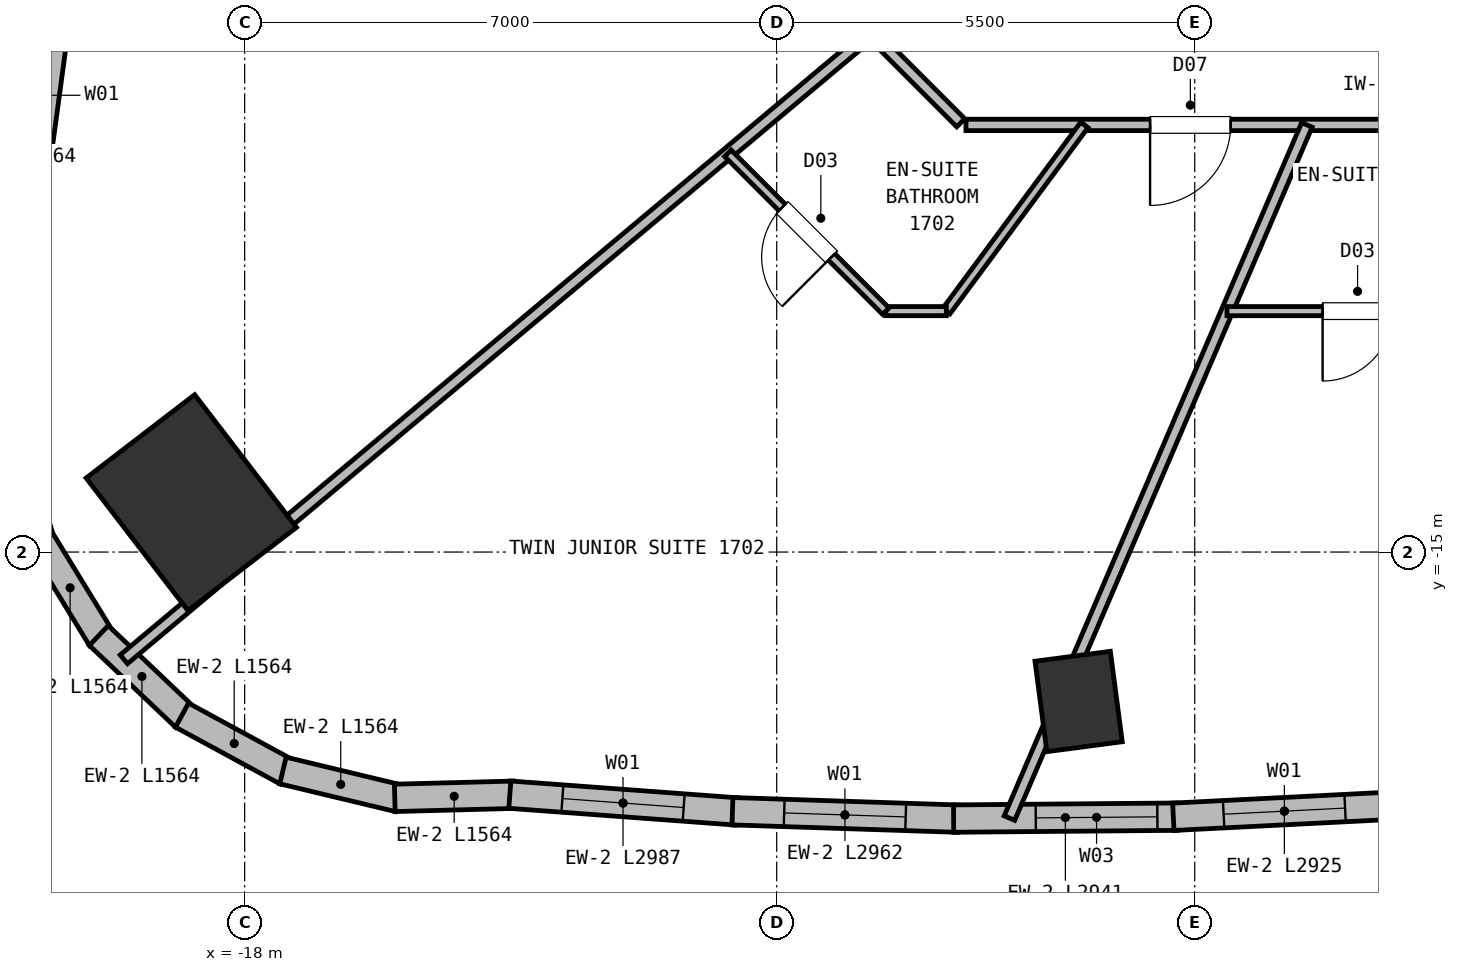
"""IFC4 building model, lengths in metres.
Left out: names, types, materials, properties, quantities, classifications, styles, units other than length and angle.
Written with IfcOpenShell. Run it as: python <this file> out.ifc"""

import sys

from ifc_helpers import new_model, si_unit, direction, frame, frame_2d, origin, origin_2d, place, context, subcontext, project, spatial, rectangle, extrude, element, fill, save


model = new_model("IFC4")
c1 = context("Model", 3, precision=1e-05, world=origin(), true_north=direction((0.0, 1.0)))
c2 = subcontext(c1, "Body", "Model", "MODEL_VIEW")
j1 = project(units=[si_unit("LENGTHUNIT", "METRE"), si_unit("PLANEANGLEUNIT", "RADIAN")], contexts=[c1])
p1 = place(None, origin())
s1 = spatial("IfcSite", under=j1, at=p1, CompositionType="ELEMENT")
p2 = place(p1, origin())
s2 = spatial("IfcBuilding", under=s1, at=p2, CompositionType="ELEMENT")
p3 = place(p2, frame((0.0, 0.0, 60.5)))
s3 = spatial("IfcBuildingStorey", under=s2, at=p3, CompositionType="ELEMENT", Elevation=60.5)
p4 = place(p3, frame((-18.702, -14.351, 0.0), z_axis=(0.0, 0.0, 1.0), x_axis=(0.793353340291, 0.608761429009, 0.0)))
e1 = element("IfcColumn", 1, at=p4, inside=s3, PredefinedType="COLUMN", context=c2, shape_type="SweptSolid", body=[
    extrude(rectangle(XDim=1.8, YDim=2.2, at=origin_2d()), origin(), (0.0, 0.0, 1.0), 3.75),
])
p5 = place(p3, frame((-7.028, -16.966, 0.0), z_axis=(0.0, 0.0, 1.0), x_axis=(0.991444861374, 0.13052619222, 0.0)))
e2 = element("IfcColumn", 2, at=p5, inside=s3, PredefinedType="COLUMN", context=c2, shape_type="SweptSolid", body=[
    extrude(rectangle(XDim=1.0, YDim=1.2, at=origin_2d()), origin(), (0.0, 0.0, 1.0), 3.75),
])
p6 = place(p3, frame((-20.812, -10.412, 0.0), z_axis=(0.0, 0.0, 1.0), x_axis=(0.134391985669, 0.990928248759, 0.0)))
e3 = element("IfcWall", 3, at=p6, inside=s3, PredefinedType="SOLIDWALL", context=c2, shape_type="SweptSolid", body=[
    extrude(rectangle(XDim=2.87, YDim=0.36, at=frame_2d((1.435, 0.0))), origin(), (0.0, 0.0, 1.0), 3.5),
])
p7 = place(p6, frame((0.635, 0.0, 0.72)))
e4 = element("IfcOpeningElement", 4, at=p7, cuts=e3, PredefinedType="OPENING", context=c2, shape_type="SweptSolid", body=[
    extrude(rectangle(XDim=1.6, YDim=1.88, at=frame_2d((0.8, 0.94))), frame((0.0, 0.19, 0.0), z_axis=(0.0, -1.0, 0.0), x_axis=(1.0, 0.0, 0.0)), (0.0, 0.0, 1.0), 0.38),
])
p8 = place(p3, frame((-20.685, -14.849, 0.0), z_axis=(0.0, 0.0, 1.0), x_axis=(-0.284067072714, 0.958804410816, 0.0)))
e5 = element("IfcWall", 5, at=p8, inside=s3, PredefinedType="SOLIDWALL", context=c2, shape_type="SweptSolid", body=[
    extrude(rectangle(XDim=1.564, YDim=0.36, at=frame_2d((0.782, 0.0))), origin(), (0.0, 0.0, 1.0), 3.5),
])
for number, where, z_axis, x_axis in (
    (6, (-19.888, -16.137, 0.0), (0.0, 0.0, 1.0), (-0.523, 0.853, 0.0)),
    (7, (-18.785, -17.175, 0.0), (0.0, 0.0, 1.0), (-0.725, 0.688, 0.0)),
    (8, (-17.45, -17.892, 0.0), (0.0, 0.0, 1.0), (-0.879, 0.477, 0.0)),
    (9, (-15.976, -18.24, 0.0), (0.0, 0.0, 1.0), (-0.972, 0.233, 0.0)),
):
    element("IfcWall", number, at=place(p3, frame(where, z_axis=z_axis, x_axis=x_axis)), inside=s3, PredefinedType="SOLIDWALL", context=c2, shape_type="SweptSolid", body=[
        extrude(rectangle(XDim=1.564, YDim=0.36, at=frame_2d((0.782, 0.0))), origin(), (0.0, 0.0, 1.0), 3.5),
    ])
p9 = place(p3, frame((-14.461, -18.193, 0.0), z_axis=(0.0, 0.0, 1.0), x_axis=(-0.999656183846, -0.026220490068, 0.0)))
e10 = element("IfcWall", 10, at=p9, inside=s3, PredefinedType="SOLIDWALL", context=c2, shape_type="SweptSolid", body=[
    extrude(rectangle(XDim=1.564, YDim=0.36, at=frame_2d((0.782, 0.0))), origin(), (0.0, 0.0, 1.0), 3.5),
])
p10 = place(p3, frame((-11.532, -18.413, 0.0), z_axis=(0.0, 0.0, 1.0), x_axis=(-0.997278449025, 0.073727166709, 0.0)))
e11 = element("IfcWall", 11, at=p10, inside=s3, PredefinedType="SOLIDWALL", context=c2, shape_type="SweptSolid", body=[
    extrude(rectangle(XDim=2.987, YDim=0.36, at=frame_2d((1.493, 0.0))), origin(), (0.0, 0.0, 1.0), 3.5),
])
p11 = place(p10, frame((0.694, 0.0, 0.72)))
e12 = element("IfcOpeningElement", 12, at=p11, cuts=e11, PredefinedType="OPENING", context=c2, shape_type="SweptSolid", body=[
    extrude(rectangle(XDim=1.6, YDim=1.88, at=frame_2d((0.8, 0.94))), frame((0.0, 0.19, 0.0), z_axis=(0.0, -1.0, 0.0), x_axis=(1.0, 0.0, 0.0)), (0.0, 0.0, 1.0), 0.38),
])
p12 = place(p3, frame((-8.622, -18.508, 0.0), z_axis=(0.0, 0.0, 1.0), x_axis=(-0.999456194292, 0.032974470283, 0.0)))
e13 = element("IfcWall", 13, at=p12, inside=s3, PredefinedType="SOLIDWALL", context=c2, shape_type="SweptSolid", body=[
    extrude(rectangle(XDim=2.962, YDim=0.36, at=frame_2d((1.481, 0.0))), origin(), (0.0, 0.0, 1.0), 3.5),
])
p13 = place(p12, frame((0.681, 0.0, 0.72)))
e14 = element("IfcOpeningElement", 14, at=p13, cuts=e13, PredefinedType="OPENING", context=c2, shape_type="SweptSolid", body=[
    extrude(rectangle(XDim=1.6, YDim=1.88, at=frame_2d((0.8, 0.94))), frame((0.0, 0.19, 0.0), z_axis=(0.0, -1.0, 0.0), x_axis=(1.0, 0.0, 0.0)), (0.0, 0.0, 1.0), 0.38),
])
p14 = place(p3, frame((-5.732, -18.482, 0.0), z_axis=(0.0, 0.0, 1.0), x_axis=(-0.999962726619, -0.008633966257, 0.0)))
e15 = element("IfcWall", 15, at=p14, inside=s3, PredefinedType="SOLIDWALL", context=c2, shape_type="SweptSolid", body=[
    extrude(rectangle(XDim=2.941, YDim=0.36, at=frame_2d((1.47, 0.0))), origin(), (0.0, 0.0, 1.0), 3.5),
])
p15 = place(p14, frame((0.26, 0.0, 0.72)))
e16 = element("IfcOpeningElement", 16, at=p15, cuts=e15, PredefinedType="OPENING", context=c2, shape_type="SweptSolid", body=[
    extrude(rectangle(XDim=1.6, YDim=1.88, at=frame_2d((0.8, 0.94))), frame((0.0, 0.19, 0.0), z_axis=(0.0, -1.0, 0.0), x_axis=(1.0, 0.0, 0.0)), (0.0, 0.0, 1.0), 0.38),
])
p16 = place(p3, frame((-2.86, -18.335, 0.0), z_axis=(0.0, 0.0, 1.0), x_axis=(-0.998716074647, -0.050657696775, 0.0)))
e17 = element("IfcWall", 17, at=p16, inside=s3, PredefinedType="SOLIDWALL", context=c2, shape_type="SweptSolid", body=[
    extrude(rectangle(XDim=2.925, YDim=0.36, at=frame_2d((1.463, 0.0))), origin(), (0.0, 0.0, 1.0), 3.5),
])
p17 = place(p16, frame((0.663, 0.0, 0.72)))
e18 = element("IfcOpeningElement", 18, at=p17, cuts=e17, PredefinedType="OPENING", context=c2, shape_type="SweptSolid", body=[
    extrude(rectangle(XDim=1.6, YDim=1.88, at=frame_2d((0.8, 0.94))), frame((0.0, 0.19, 0.0), z_axis=(0.0, -1.0, 0.0), x_axis=(1.0, 0.0, 0.0)), (0.0, 0.0, 1.0), 0.38),
])
p18 = place(p3, frame((8.51, -9.38, 0.0), z_axis=(0.0, 0.0, 1.0), x_axis=(-1.0, 0.0, 0.0)))
e19 = element("IfcWall", 19, at=p18, inside=s3, PredefinedType="PARTITIONING", context=c2, shape_type="SweptSolid", body=[
    extrude(rectangle(XDim=17.02, YDim=0.15, at=frame_2d((8.51, 0.0))), origin(), (0.0, 0.0, 1.0), 3.5),
])
p19 = place(p18, frame((2.589, 0.0, 0.0)))
e20 = element("IfcOpeningElement", 20, at=p19, cuts=e19, PredefinedType="OPENING", context=c2, shape_type="SweptSolid", body=[
    extrude(rectangle(XDim=1.0, YDim=2.15, at=frame_2d((0.5, 1.075))), frame((0.0, 0.085, 0.0), z_axis=(0.0, -1.0, 0.0), x_axis=(1.0, 0.0, 0.0)), (0.0, 0.0, 1.0), 0.17),
])
p20 = place(p18, frame((7.843, 0.0, 0.0)))
e21 = element("IfcOpeningElement", 21, at=p20, cuts=e19, PredefinedType="OPENING", context=c2, shape_type="SweptSolid", body=[
    extrude(rectangle(XDim=1.06, YDim=2.15, at=frame_2d((0.53, 1.075))), frame((0.0, 0.085, 0.0), z_axis=(0.0, -1.0, 0.0), x_axis=(1.0, 0.0, 0.0)), (0.0, 0.0, 1.0), 0.17),
])
p21 = place(p18, frame((13.537, 0.0, 0.0)))
e22 = element("IfcOpeningElement", 22, at=p21, cuts=e19, PredefinedType="OPENING", context=c2, shape_type="SweptSolid", body=[
    extrude(rectangle(XDim=1.06, YDim=2.15, at=frame_2d((0.53, 1.075))), frame((0.0, 0.085, 0.0), z_axis=(0.0, -1.0, 0.0), x_axis=(1.0, 0.0, 0.0)), (0.0, 0.0, 1.0), 0.17),
])
p22 = place(p3, frame((-8.578, -9.352, 0.0), z_axis=(0.0, 0.0, 1.0), x_axis=(-0.707067066127, 0.707146494016, 0.0)))
e23 = element("IfcWall", 23, at=p22, inside=s3, PredefinedType="PARTITIONING", context=c2, shape_type="SweptSolid", body=[
    extrude(rectangle(XDim=3.074, YDim=0.15, at=frame_2d((1.537, 0.0))), origin(), (0.0, 0.0, 1.0), 3.5),
])
p23 = place(p3, frame((-9.756, -8.174, 0.0), z_axis=(0.0, 0.0, 1.0), x_axis=(-0.766555678026, -0.642177851134, 0.0)))
e24 = element("IfcWall", 24, at=p23, inside=s3, PredefinedType="PARTITIONING", context=c2, shape_type="SweptSolid", body=[
    extrude(rectangle(XDim=12.828, YDim=0.15, at=frame_2d((6.414, 0.0))), origin(), (0.0, 0.0, 1.0), 3.5),
])
p24 = place(p3, frame((-8.768, -11.83, 0.0), z_axis=(0.0, 0.0, 1.0), x_axis=(0.595378789074, 0.80344514282, 0.0)))
e25 = element("IfcWall", 25, at=p24, inside=s3, PredefinedType="PARTITIONING", context=c2, shape_type="SweptSolid", body=[
    extrude(rectangle(XDim=3.05, YDim=0.12, at=frame_2d((1.525, 0.0))), origin(), (0.0, 0.0, 1.0), 3.5),
])
p25 = place(p3, frame((-8.768, -11.83, 0.0), z_axis=(0.0, 0.0, 1.0), x_axis=(-1.0, 0.0, 0.0)))
e26 = element("IfcWall", 26, at=p25, inside=s3, PredefinedType="PARTITIONING", context=c2, shape_type="SweptSolid", body=[
    extrude(rectangle(XDim=0.797, YDim=0.12, at=frame_2d((0.398, 0.0))), origin(), (0.0, 0.0, 1.0), 3.5),
])
p26 = place(p3, frame((-9.565, -11.83, 0.0), z_axis=(0.0, 0.0, 1.0), x_axis=(-0.707106781187, 0.707106781187, 0.0)))
e27 = element("IfcWall", 27, at=p26, inside=s3, PredefinedType="PARTITIONING", context=c2, shape_type="SweptSolid", body=[
    extrude(rectangle(XDim=2.938, YDim=0.12, at=frame_2d((1.469, 0.0))), origin(), (0.0, 0.0, 1.0), 3.5),
])
p27 = place(p26, frame((1.009, 0.0, 0.0)))
e28 = element("IfcOpeningElement", 28, at=p27, cuts=e27, PredefinedType="OPENING", context=c2, shape_type="SweptSolid", body=[
    extrude(rectangle(XDim=0.92, YDim=2.1, at=frame_2d((0.46, 1.05))), frame((0.0, 0.07, 0.0), z_axis=(0.0, -1.0, 0.0), x_axis=(1.0, 0.0, 0.0)), (0.0, 0.0, 1.0), 0.14),
])
p28 = place(p3, frame((-4.025, -9.38, 0.0), z_axis=(0.0, 0.0, 1.0), x_axis=(-0.394293336578, -0.918984637919, 0.0)))
e29 = element("IfcWall", 29, at=p28, inside=s3, PredefinedType="PARTITIONING", context=c2, shape_type="SweptSolid", body=[
    extrude(rectangle(XDim=9.925, YDim=0.15, at=frame_2d((4.962, 0.0))), origin(), (0.0, 0.0, 1.0), 3.5),
])
p29 = place(p3, frame((-1.639, -11.83, 0.0), z_axis=(0.0, 0.0, 1.0), x_axis=(-1.0, 0.0, 0.0)))
e30 = element("IfcWall", 30, at=p29, inside=s3, PredefinedType="PARTITIONING", context=c2, shape_type="SweptSolid", body=[
    extrude(rectangle(XDim=3.437, YDim=0.12, at=frame_2d((1.718, 0.0))), origin(), (0.0, 0.0, 1.0), 3.5),
])
p30 = place(p29, frame((1.258, 0.0, 0.0)))
e31 = element("IfcOpeningElement", 31, at=p30, cuts=e30, PredefinedType="OPENING", context=c2, shape_type="SweptSolid", body=[
    extrude(rectangle(XDim=0.92, YDim=2.1, at=frame_2d((0.46, 1.05))), frame((0.0, 0.07, 0.0), z_axis=(0.0, -1.0, 0.0), x_axis=(1.0, 0.0, 0.0)), (0.0, 0.0, 1.0), 0.14),
])
p31 = place(p7, origin())
e32 = element("IfcWindow", 32, at=p31, inside=s3, PartitioningType="SINGLE_PANEL", PredefinedType="WINDOW", context=c2, shape_type="SweptSolid", body=[
    extrude(rectangle(XDim=1.6, YDim=1.88, at=frame_2d((0.8, 0.94))), frame((0.0, 0.03, 0.0), z_axis=(0.0, -1.0, 0.0), x_axis=(1.0, 0.0, 0.0)), (0.0, 0.0, 1.0), 0.06),
])
fill(e4, e32)
p32 = place(p11, origin())
e33 = element("IfcWindow", 33, at=p32, inside=s3, PartitioningType="SINGLE_PANEL", PredefinedType="WINDOW", context=c2, shape_type="SweptSolid", body=[
    extrude(rectangle(XDim=1.6, YDim=1.88, at=frame_2d((0.8, 0.94))), frame((0.0, 0.03, 0.0), z_axis=(0.0, -1.0, 0.0), x_axis=(1.0, 0.0, 0.0)), (0.0, 0.0, 1.0), 0.06),
])
fill(e12, e33)
p33 = place(p13, origin())
e34 = element("IfcWindow", 34, at=p33, inside=s3, PartitioningType="SINGLE_PANEL", PredefinedType="WINDOW", context=c2, shape_type="SweptSolid", body=[
    extrude(rectangle(XDim=1.6, YDim=1.88, at=frame_2d((0.8, 0.94))), frame((0.0, 0.03, 0.0), z_axis=(0.0, -1.0, 0.0), x_axis=(1.0, 0.0, 0.0)), (0.0, 0.0, 1.0), 0.06),
])
fill(e14, e34)
p34 = place(p15, origin())
e35 = element("IfcWindow", 35, at=p34, inside=s3, PartitioningType="SINGLE_PANEL", PredefinedType="WINDOW", context=c2, shape_type="SweptSolid", body=[
    extrude(rectangle(XDim=1.6, YDim=1.88, at=frame_2d((0.8, 0.94))), frame((0.0, 0.03, 0.0), z_axis=(0.0, -1.0, 0.0), x_axis=(1.0, 0.0, 0.0)), (0.0, 0.0, 1.0), 0.06),
])
fill(e16, e35)
p35 = place(p17, origin())
e36 = element("IfcWindow", 36, at=p35, inside=s3, PartitioningType="SINGLE_PANEL", PredefinedType="WINDOW", context=c2, shape_type="SweptSolid", body=[
    extrude(rectangle(XDim=1.6, YDim=1.88, at=frame_2d((0.8, 0.94))), frame((0.0, 0.03, 0.0), z_axis=(0.0, -1.0, 0.0), x_axis=(1.0, 0.0, 0.0)), (0.0, 0.0, 1.0), 0.06),
])
fill(e18, e36)
p36 = place(p27, origin())
e37 = element("IfcDoor", 37, at=p36, inside=s3, OperationType="SINGLE_SWING_LEFT", PredefinedType="DOOR", context=c2, shape_type="SweptSolid", body=[
    extrude(rectangle(XDim=0.92, YDim=2.1, at=frame_2d((0.46, 1.05))), frame((0.0, 0.025, 0.0), z_axis=(0.0, -1.0, 0.0), x_axis=(1.0, 0.0, 0.0)), (0.0, 0.0, 1.0), 0.05),
])
fill(e28, e37)
p37 = place(p30, origin())
e38 = element("IfcDoor", 38, at=p37, inside=s3, OperationType="SINGLE_SWING_RIGHT", PredefinedType="DOOR", context=c2, shape_type="SweptSolid", body=[
    extrude(rectangle(XDim=0.92, YDim=2.1, at=frame_2d((0.46, 1.05))), frame((0.0, 0.025, 0.0), z_axis=(0.0, -1.0, 0.0), x_axis=(1.0, 0.0, 0.0)), (0.0, 0.0, 1.0), 0.05),
])
fill(e31, e38)
p38 = place(p21, origin())
e39 = element("IfcDoor", 39, at=p38, inside=s3, OperationType="SINGLE_SWING_RIGHT", PredefinedType="DOOR", context=c2, shape_type="SweptSolid", body=[
    extrude(rectangle(XDim=1.06, YDim=2.15, at=frame_2d((0.53, 1.075))), frame((0.0, 0.025, 0.0), z_axis=(0.0, -1.0, 0.0), x_axis=(1.0, 0.0, 0.0)), (0.0, 0.0, 1.0), 0.05),
])
fill(e22, e39)
save(model, sys.argv[1])
